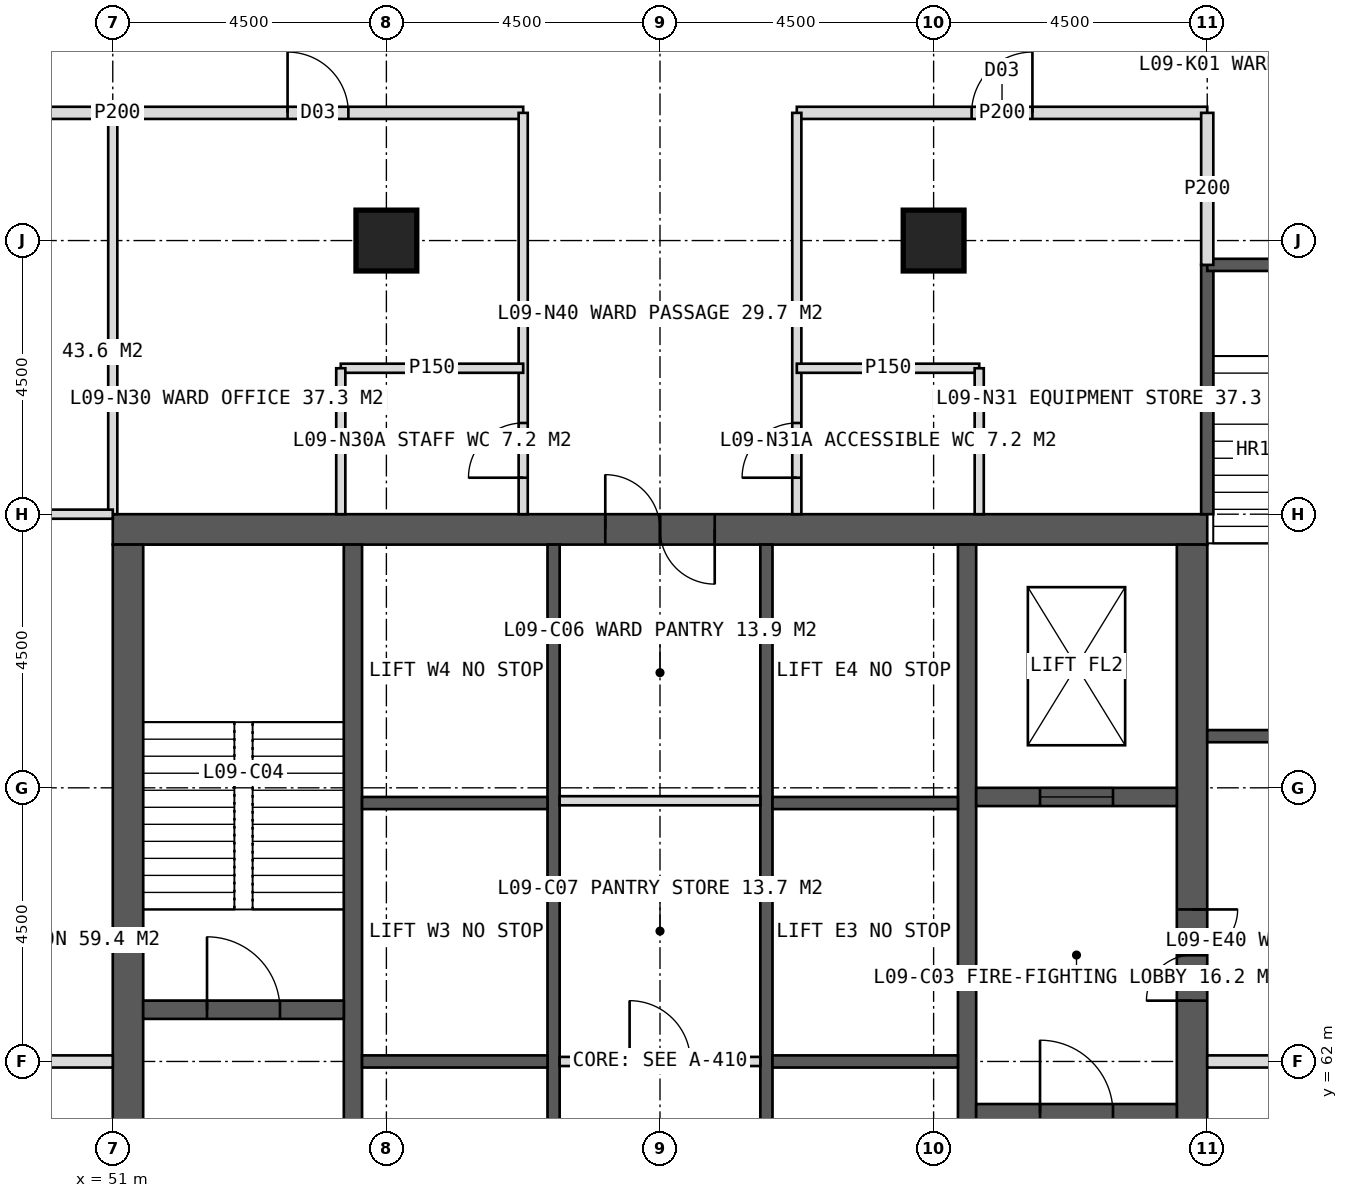
"""IFC4 building model, lengths in metres.
Left out: names, types, materials, properties, quantities, classifications, styles, units other than length and angle.
Written with IfcOpenShell. Run it as: python <this file> out.ifc"""

import sys

from ifc_helpers import new_model, si_unit, direction, frame, frame_2d, origin, origin_2d, place, context, subcontext, project, spatial, rectangle, hollow_rectangle, extrude, element, fill, save


model = new_model("IFC4")
c1 = context("Model", 3, precision=1e-05, world=origin(), true_north=direction((0.0, 1.0)))
c2 = subcontext(c1, "Body", "Model", "MODEL_VIEW")
j1 = project(units=[si_unit("LENGTHUNIT", "METRE"), si_unit("PLANEANGLEUNIT", "RADIAN")], contexts=[c1])
p1 = place(None, origin())
s1 = spatial("IfcSite", under=j1, at=p1, CompositionType="ELEMENT")
p2 = place(p1, origin())
s2 = spatial("IfcBuilding", under=s1, at=p2, CompositionType="ELEMENT")
p3 = place(p2, frame((0.0, 0.0, 43.0)))
s3 = spatial("IfcBuildingStorey", under=s2, at=p3, CompositionType="ELEMENT", Elevation=43.0)
p4 = place(p3, frame((51.0, 70.75, 0.0), z_axis=(0.0, 0.0, 1.0), x_axis=(1.0, 0.0, 0.0)))
e1 = element("IfcWall", 1, at=p4, inside=s3, PredefinedType="SHEAR", context=c2, shape_type="SweptSolid", body=[
    extrude(rectangle(XDim=18.0, YDim=0.5, at=frame_2d((9.0, 0.0))), origin(), (0.0, 0.0, 1.0), 4.0),
])
p5 = place(p4, frame((8.1, 0.0, 0.0)))
e2 = element("IfcOpeningElement", 2, at=p5, cuts=e1, PredefinedType="OPENING", context=c2, shape_type="SweptSolid", body=[
    extrude(rectangle(XDim=1.8, YDim=2.2, at=frame_2d((0.9, 1.1))), frame((0.0, 0.26, 0.0), z_axis=(0.0, -1.0, 0.0), x_axis=(1.0, 0.0, 0.0)), (0.0, 0.0, 1.0), 0.52),
])
p6 = place(p3, frame((51.25, 53.5, 0.0), z_axis=(0.0, 0.0, 1.0), x_axis=(0.0, 1.0, 0.0)))
e3 = element("IfcWall", 3, at=p6, inside=s3, PredefinedType="SHEAR", context=c2, shape_type="SweptSolid", body=[
    extrude(rectangle(XDim=17.0, YDim=0.5, at=frame_2d((8.5, 0.0))), origin(), (0.0, 0.0, 1.0), 4.0),
])
p7 = place(p6, frame((6.0, 0.0, 0.0)))
e4 = element("IfcOpeningElement", 4, at=p7, cuts=e3, PredefinedType="OPENING", context=c2, shape_type="SweptSolid", body=[
    extrude(rectangle(XDim=1.5, YDim=2.2, at=frame_2d((0.75, 1.1))), frame((0.0, 0.26, 0.0), z_axis=(0.0, -1.0, 0.0), x_axis=(1.0, 0.0, 0.0)), (0.0, 0.0, 1.0), 0.52),
])
p8 = place(p3, frame((68.75, 53.5, 0.0), z_axis=(0.0, 0.0, 1.0), x_axis=(0.0, 1.0, 0.0)))
e5 = element("IfcWall", 5, at=p8, inside=s3, PredefinedType="SHEAR", context=c2, shape_type="SweptSolid", body=[
    extrude(rectangle(XDim=17.0, YDim=0.5, at=frame_2d((8.5, 0.0))), origin(), (0.0, 0.0, 1.0), 4.0),
])
p9 = place(p8, frame((9.5, 0.0, 0.0)))
e6 = element("IfcOpeningElement", 6, at=p9, cuts=e5, PredefinedType="OPENING", context=c2, shape_type="SweptSolid", body=[
    extrude(rectangle(XDim=1.5, YDim=2.2, at=frame_2d((0.75, 1.1))), frame((0.0, 0.26, 0.0), z_axis=(0.0, -1.0, 0.0), x_axis=(1.0, 0.0, 0.0)), (0.0, 0.0, 1.0), 0.52),
])
for number, where, z_axis, x_axis in (
    (7, (54.95, 53.5, 0.0), (0.0, 0.0, 1.0), (0.0, 1.0, 0.0)),
    (8, (65.05, 53.5, 0.0), (0.0, 0.0, 1.0), (0.0, 1.0, 0.0)),
):
    element("IfcWall", number, at=place(p3, frame(where, z_axis=z_axis, x_axis=x_axis)), inside=s3, PredefinedType="SHEAR", context=c2, shape_type="SweptSolid", body=[
        extrude(rectangle(XDim=17.0, YDim=0.3, at=frame_2d((8.5, 0.0))), origin(), (0.0, 0.0, 1.0), 4.0),
    ])
p10 = place(p3, frame((58.25, 53.5, 0.0), z_axis=(0.0, 0.0, 1.0), x_axis=(0.0, 1.0, 0.0)))
e9 = element("IfcWall", 9, at=p10, inside=s3, PredefinedType="SHEAR", context=c2, shape_type="SweptSolid", body=[
    extrude(rectangle(XDim=17.0, YDim=0.2, at=frame_2d((8.5, 0.0))), origin(), (0.0, 0.0, 1.0), 4.0),
])
p11 = place(p10, frame((1.375, 0.0, 0.0)))
e10 = element("IfcOpeningElement", 10, at=p11, cuts=e9, PredefinedType="OPENING", context=c2, shape_type="SweptSolid", body=[
    extrude(rectangle(XDim=1.4, YDim=2.2, at=frame_2d((0.7, 1.1))), frame((0.0, 0.11, 0.0), z_axis=(0.0, -1.0, 0.0), x_axis=(1.0, 0.0, 0.0)), (0.0, 0.0, 1.0), 0.22),
])
p12 = place(p10, frame((5.675, 0.0, 0.0)))
e11 = element("IfcOpeningElement", 11, at=p12, cuts=e9, PredefinedType="OPENING", context=c2, shape_type="SweptSolid", body=[
    extrude(rectangle(XDim=1.4, YDim=2.2, at=frame_2d((0.7, 1.1))), frame((0.0, 0.11, 0.0), z_axis=(0.0, -1.0, 0.0), x_axis=(1.0, 0.0, 0.0)), (0.0, 0.0, 1.0), 0.22),
])
p13 = place(p3, frame((61.75, 53.5, 0.0), z_axis=(0.0, 0.0, 1.0), x_axis=(0.0, 1.0, 0.0)))
e12 = element("IfcWall", 12, at=p13, inside=s3, PredefinedType="SHEAR", context=c2, shape_type="SweptSolid", body=[
    extrude(rectangle(XDim=17.0, YDim=0.2, at=frame_2d((8.5, 0.0))), origin(), (0.0, 0.0, 1.0), 4.0),
])
p14 = place(p13, frame((1.375, 0.0, 0.0)))
e13 = element("IfcOpeningElement", 13, at=p14, cuts=e12, PredefinedType="OPENING", context=c2, shape_type="SweptSolid", body=[
    extrude(rectangle(XDim=1.4, YDim=2.2, at=frame_2d((0.7, 1.1))), frame((0.0, 0.11, 0.0), z_axis=(0.0, -1.0, 0.0), x_axis=(1.0, 0.0, 0.0)), (0.0, 0.0, 1.0), 0.22),
])
p15 = place(p13, frame((5.675, 0.0, 0.0)))
e14 = element("IfcOpeningElement", 14, at=p15, cuts=e12, PredefinedType="OPENING", context=c2, shape_type="SweptSolid", body=[
    extrude(rectangle(XDim=1.4, YDim=2.2, at=frame_2d((0.7, 1.1))), frame((0.0, 0.11, 0.0), z_axis=(0.0, -1.0, 0.0), x_axis=(1.0, 0.0, 0.0)), (0.0, 0.0, 1.0), 0.22),
])
for number, where, z_axis, x_axis in (
    (15, (55.1, 62.0, 0.0), (0.0, 0.0, 1.0), (1.0, 0.0, 0.0)),
    (16, (61.85, 62.0, 0.0), (0.0, 0.0, 1.0), (1.0, 0.0, 0.0)),
    (17, (55.1, 66.25, 0.0), (0.0, 0.0, 1.0), (1.0, 0.0, 0.0)),
    (18, (61.85, 66.25, 0.0), (0.0, 0.0, 1.0), (1.0, 0.0, 0.0)),
):
    element("IfcWall", number, at=place(p3, frame(where, z_axis=z_axis, x_axis=x_axis)), inside=s3, PredefinedType="SHEAR", context=c2, shape_type="SweptSolid", body=[
        extrude(rectangle(XDim=3.05, YDim=0.2, at=frame_2d((1.525, 0.0))), origin(), (0.0, 0.0, 1.0), 4.0),
    ])
p16 = place(p3, frame((51.5, 62.85, 0.0), z_axis=(0.0, 0.0, 1.0), x_axis=(1.0, 0.0, 0.0)))
e19 = element("IfcWall", 19, at=p16, inside=s3, PredefinedType="SHEAR", context=c2, shape_type="SweptSolid", body=[
    extrude(rectangle(XDim=3.3, YDim=0.3, at=frame_2d((1.65, 0.0))), origin(), (0.0, 0.0, 1.0), 4.0),
])
p17 = place(p16, frame((1.05, 0.0, 0.0)))
e20 = element("IfcOpeningElement", 20, at=p17, cuts=e19, PredefinedType="OPENING", context=c2, shape_type="SweptSolid", body=[
    extrude(rectangle(XDim=1.2, YDim=2.1, at=frame_2d((0.6, 1.05))), frame((0.0, 0.16, 0.0), z_axis=(0.0, -1.0, 0.0), x_axis=(1.0, 0.0, 0.0)), (0.0, 0.0, 1.0), 0.32),
])
p18 = place(p3, frame((65.2, 61.15, 0.0), z_axis=(0.0, 0.0, 1.0), x_axis=(1.0, 0.0, 0.0)))
e21 = element("IfcWall", 21, at=p18, inside=s3, PredefinedType="SHEAR", context=c2, shape_type="SweptSolid", body=[
    extrude(rectangle(XDim=3.3, YDim=0.3, at=frame_2d((1.65, 0.0))), origin(), (0.0, 0.0, 1.0), 4.0),
])
p19 = place(p18, frame((1.05, 0.0, 0.0)))
e22 = element("IfcOpeningElement", 22, at=p19, cuts=e21, PredefinedType="OPENING", context=c2, shape_type="SweptSolid", body=[
    extrude(rectangle(XDim=1.2, YDim=2.1, at=frame_2d((0.6, 1.05))), frame((0.0, 0.16, 0.0), z_axis=(0.0, -1.0, 0.0), x_axis=(1.0, 0.0, 0.0)), (0.0, 0.0, 1.0), 0.32),
])
p20 = place(p3, frame((65.2, 66.35, 0.0), z_axis=(0.0, 0.0, 1.0), x_axis=(1.0, 0.0, 0.0)))
e23 = element("IfcWall", 23, at=p20, inside=s3, PredefinedType="SHEAR", context=c2, shape_type="SweptSolid", body=[
    extrude(rectangle(XDim=3.3, YDim=0.3, at=frame_2d((1.65, 0.0))), origin(), (0.0, 0.0, 1.0), 4.0),
])
p21 = place(p20, frame((1.05, 0.0, 0.0)))
e24 = element("IfcOpeningElement", 24, at=p21, cuts=e23, PredefinedType="OPENING", context=c2, shape_type="SweptSolid", body=[
    extrude(rectangle(XDim=1.2, YDim=2.2, at=frame_2d((0.6, 1.1))), frame((0.0, 0.16, 0.0), z_axis=(0.0, -1.0, 0.0), x_axis=(1.0, 0.0, 0.0)), (0.0, 0.0, 1.0), 0.32),
])
for number, where, z_axis, x_axis in (
    (25, (55.5, 75.5, 0.0), (0.0, 0.0, 1.0), (1.0, 0.0, 0.0)),
    (26, (64.5, 75.5, 0.0), (0.0, 0.0, 1.0), (1.0, 0.0, 0.0)),
):
    element("IfcColumn", number, at=place(p3, frame(where, z_axis=z_axis, x_axis=x_axis)), inside=s3, PredefinedType="COLUMN", context=c2, shape_type="SweptSolid", body=[
        extrude(hollow_rectangle(XDim=1.0, YDim=1.0, WallThickness=0.1, at=origin_2d()), origin(), (0.0, 0.0, 1.0), 4.0),
    ])
p22 = place(p3, frame((51.0, 71.0, 0.0), z_axis=(0.0, 0.0, 1.0), x_axis=(0.0, 1.0, 0.0)))
e27 = element("IfcWall", 27, at=p22, inside=s3, PredefinedType="PARTITIONING", context=c2, shape_type="SweptSolid", body=[
    extrude(rectangle(XDim=6.6, YDim=0.15, at=frame_2d((3.3, 0.0))), origin(), (0.0, 0.0, 1.0), 3.75),
])
p23 = place(p3, frame((44.4, 77.6, 0.0), z_axis=(0.0, 0.0, 1.0), x_axis=(1.0, 0.0, 0.0)))
e28 = element("IfcWall", 28, at=p23, inside=s3, PredefinedType="PARTITIONING", context=c2, shape_type="SweptSolid", body=[
    extrude(rectangle(XDim=13.35, YDim=0.2, at=frame_2d((6.675, 0.0))), origin(), (0.0, 0.0, 1.0), 3.75),
])
p24 = place(p23, frame((9.475, 0.0, 0.0)))
e29 = element("IfcOpeningElement", 29, at=p24, cuts=e28, PredefinedType="OPENING", context=c2, shape_type="SweptSolid", body=[
    extrude(rectangle(XDim=1.0, YDim=2.1, at=frame_2d((0.5, 1.05))), frame((0.0, 0.11, 0.0), z_axis=(0.0, -1.0, 0.0), x_axis=(1.0, 0.0, 0.0)), (0.0, 0.0, 1.0), 0.22),
])
p25 = place(p3, frame((62.25, 77.6, 0.0), z_axis=(0.0, 0.0, 1.0), x_axis=(1.0, 0.0, 0.0)))
e30 = element("IfcWall", 30, at=p25, inside=s3, PredefinedType="PARTITIONING", context=c2, shape_type="SweptSolid", body=[
    extrude(rectangle(XDim=6.75, YDim=0.2, at=frame_2d((3.375, 0.0))), origin(), (0.0, 0.0, 1.0), 3.75),
])
p26 = place(p25, frame((2.875, 0.0, 0.0)))
e31 = element("IfcOpeningElement", 31, at=p26, cuts=e30, PredefinedType="OPENING", context=c2, shape_type="SweptSolid", body=[
    extrude(rectangle(XDim=1.0, YDim=2.1, at=frame_2d((0.5, 1.05))), frame((0.0, 0.11, 0.0), z_axis=(0.0, -1.0, 0.0), x_axis=(1.0, 0.0, 0.0)), (0.0, 0.0, 1.0), 0.22),
])
p27 = place(p3, frame((57.75, 71.0, 0.0), z_axis=(0.0, 0.0, 1.0), x_axis=(0.0, 1.0, 0.0)))
e32 = element("IfcWall", 32, at=p27, inside=s3, PredefinedType="PARTITIONING", context=c2, shape_type="SweptSolid", body=[
    extrude(rectangle(XDim=6.6, YDim=0.15, at=frame_2d((3.3, 0.0))), origin(), (0.0, 0.0, 1.0), 3.75),
])
p28 = place(p27, frame((0.6, 0.0, 0.0)))
e33 = element("IfcOpeningElement", 33, at=p28, cuts=e32, PredefinedType="OPENING", context=c2, shape_type="SweptSolid", body=[
    extrude(rectangle(XDim=0.9, YDim=2.1, at=frame_2d((0.45, 1.05))), frame((0.0, 0.085, 0.0), z_axis=(0.0, -1.0, 0.0), x_axis=(1.0, 0.0, 0.0)), (0.0, 0.0, 1.0), 0.17),
])
p29 = place(p3, frame((62.25, 71.0, 0.0), z_axis=(0.0, 0.0, 1.0), x_axis=(0.0, 1.0, 0.0)))
e34 = element("IfcWall", 34, at=p29, inside=s3, PredefinedType="PARTITIONING", context=c2, shape_type="SweptSolid", body=[
    extrude(rectangle(XDim=6.6, YDim=0.15, at=frame_2d((3.3, 0.0))), origin(), (0.0, 0.0, 1.0), 3.75),
])
p30 = place(p29, frame((0.6, 0.0, 0.0)))
e35 = element("IfcOpeningElement", 35, at=p30, cuts=e34, PredefinedType="OPENING", context=c2, shape_type="SweptSolid", body=[
    extrude(rectangle(XDim=0.9, YDim=2.1, at=frame_2d((0.45, 1.05))), frame((0.0, 0.085, 0.0), z_axis=(0.0, -1.0, 0.0), x_axis=(1.0, 0.0, 0.0)), (0.0, 0.0, 1.0), 0.17),
])
p31 = place(p3, frame((54.75, 73.4, 0.0), z_axis=(0.0, 0.0, 1.0), x_axis=(1.0, 0.0, 0.0)))
e36 = element("IfcWall", 36, at=p31, inside=s3, PredefinedType="PARTITIONING", context=c2, shape_type="SweptSolid", body=[
    extrude(rectangle(XDim=3.0, YDim=0.15, at=frame_2d((1.5, 0.0))), origin(), (0.0, 0.0, 1.0), 3.75),
])
p32 = place(p3, frame((54.75, 71.0, 0.0), z_axis=(0.0, 0.0, 1.0), x_axis=(0.0, 1.0, 0.0)))
e37 = element("IfcWall", 37, at=p32, inside=s3, PredefinedType="PARTITIONING", context=c2, shape_type="SweptSolid", body=[
    extrude(rectangle(XDim=2.4, YDim=0.15, at=frame_2d((1.2, 0.0))), origin(), (0.0, 0.0, 1.0), 3.75),
])
p33 = place(p3, frame((62.25, 73.4, 0.0), z_axis=(0.0, 0.0, 1.0), x_axis=(1.0, 0.0, 0.0)))
e38 = element("IfcWall", 38, at=p33, inside=s3, PredefinedType="PARTITIONING", context=c2, shape_type="SweptSolid", body=[
    extrude(rectangle(XDim=3.0, YDim=0.15, at=frame_2d((1.5, 0.0))), origin(), (0.0, 0.0, 1.0), 3.75),
])
p34 = place(p3, frame((65.25, 71.0, 0.0), z_axis=(0.0, 0.0, 1.0), x_axis=(0.0, 1.0, 0.0)))
e39 = element("IfcWall", 39, at=p34, inside=s3, PredefinedType="PARTITIONING", context=c2, shape_type="SweptSolid", body=[
    extrude(rectangle(XDim=2.4, YDim=0.15, at=frame_2d((1.2, 0.0))), origin(), (0.0, 0.0, 1.0), 3.75),
])
p35 = place(p3, frame((51.0, 62.0, 0.0), z_axis=(0.0, 0.0, 1.0), x_axis=(-1.0, 0.0, 0.0)))
e40 = element("IfcWall", 40, at=p35, inside=s3, PredefinedType="SOLIDWALL", context=c2, shape_type="SweptSolid", body=[
    extrude(rectangle(XDim=6.6, YDim=0.2, at=frame_2d((3.3, 0.0))), origin(), (0.0, 0.0, 1.0), 2.75),
])
p36 = place(p3, frame((51.0, 71.0, 0.0), z_axis=(0.0, 0.0, 1.0), x_axis=(-1.0, 0.0, 0.0)))
e41 = element("IfcWall", 41, at=p36, inside=s3, PredefinedType="PARTITIONING", context=c2, shape_type="SweptSolid", body=[
    extrude(rectangle(XDim=6.6, YDim=0.15, at=frame_2d((3.3, 0.0))), origin(), (0.0, 0.0, 1.0), 3.75),
])
p37 = place(p3, frame((69.0, 62.0, 0.0), z_axis=(0.0, 0.0, 1.0), x_axis=(1.0, 0.0, 0.0)))
e42 = element("IfcWall", 42, at=p37, inside=s3, PredefinedType="SOLIDWALL", context=c2, shape_type="SweptSolid", body=[
    extrude(rectangle(XDim=6.6, YDim=0.2, at=frame_2d((3.3, 0.0))), origin(), (0.0, 0.0, 1.0), 2.75),
])
p38 = place(p3, frame((58.35, 62.0, 0.0), z_axis=(0.0, 0.0, 1.0), x_axis=(1.0, 0.0, 0.0)))
e43 = element("IfcWall", 43, at=p38, inside=s3, PredefinedType="PARTITIONING", context=c2, shape_type="SweptSolid", body=[
    extrude(rectangle(XDim=3.3, YDim=0.15, at=frame_2d((1.65, 0.0))), origin(), (0.0, 0.0, 1.0), 3.75),
])
p39 = place(p38, frame((1.15, 0.0, 0.0)))
e44 = element("IfcOpeningElement", 44, at=p39, cuts=e43, PredefinedType="OPENING", context=c2, shape_type="SweptSolid", body=[
    extrude(rectangle(XDim=1.0, YDim=2.1, at=frame_2d((0.5, 1.05))), frame((0.0, 0.085, 0.0), z_axis=(0.0, -1.0, 0.0), x_axis=(1.0, 0.0, 0.0)), (0.0, 0.0, 1.0), 0.17),
])
p40 = place(p3, frame((58.35, 66.288, 0.0), z_axis=(0.0, 0.0, 1.0), x_axis=(1.0, 0.0, 0.0)))
e45 = element("IfcWall", 45, at=p40, inside=s3, PredefinedType="PARTITIONING", context=c2, shape_type="SweptSolid", body=[
    extrude(rectangle(XDim=3.3, YDim=0.15, at=frame_2d((1.65, 0.0))), origin(), (0.0, 0.0, 1.0), 3.75),
])
p41 = place(p3, frame((69.0, 71.0, 0.0), z_axis=(0.0, 0.0, 1.0), x_axis=(0.0, 1.0, 0.0)))
e46 = element("IfcWall", 46, at=p41, inside=s3, PredefinedType="SOLIDWALL", context=c2, shape_type="SweptSolid", body=[
    extrude(rectangle(XDim=4.1, YDim=0.2, at=frame_2d((2.05, 0.0))), origin(), (0.0, 0.0, 1.0), 3.75),
])
p42 = place(p3, frame((69.0, 67.35, 0.0), z_axis=(0.0, 0.0, 1.0), x_axis=(1.0, 0.0, 0.0)))
e47 = element("IfcWall", 47, at=p42, inside=s3, PredefinedType="SOLIDWALL", context=c2, shape_type="SweptSolid", body=[
    extrude(rectangle(XDim=3.5, YDim=0.2, at=frame_2d((1.75, 0.0))), origin(), (0.0, 0.0, 1.0), 3.75),
])
p43 = place(p3, frame((69.0, 75.1, 0.0), z_axis=(0.0, 0.0, 1.0), x_axis=(1.0, 0.0, 0.0)))
e48 = element("IfcWall", 48, at=p43, inside=s3, PredefinedType="SOLIDWALL", context=c2, shape_type="SweptSolid", body=[
    extrude(rectangle(XDim=3.5, YDim=0.2, at=frame_2d((1.75, 0.0))), origin(), (0.0, 0.0, 1.0), 3.75),
])
p44 = place(p43, frame((1.15, 0.0, 0.0)))
e49 = element("IfcOpeningElement", 49, at=p44, cuts=e48, PredefinedType="OPENING", context=c2, shape_type="SweptSolid", body=[
    extrude(rectangle(XDim=1.2, YDim=2.1, at=frame_2d((0.6, 1.05))), frame((0.0, 0.11, 0.0), z_axis=(0.0, -1.0, 0.0), x_axis=(1.0, 0.0, 0.0)), (0.0, 0.0, 1.0), 0.22),
])
p45 = place(p3, frame((69.0, 75.1, 0.0), z_axis=(0.0, 0.0, 1.0), x_axis=(0.0, 1.0, 0.0)))
e50 = element("IfcWall", 50, at=p45, inside=s3, PredefinedType="PARTITIONING", context=c2, shape_type="SweptSolid", body=[
    extrude(rectangle(XDim=2.5, YDim=0.2, at=frame_2d((1.25, 0.0))), origin(), (0.0, 0.0, 1.0), 3.75),
])
p46 = place(p28, origin())
e51 = element("IfcDoor", 51, at=p46, inside=s3, OperationType="SINGLE_SWING_LEFT", PredefinedType="DOOR", context=c2, shape_type="SweptSolid", body=[
    extrude(rectangle(XDim=0.9, YDim=2.1, at=frame_2d((0.45, 1.05))), frame((0.0, 0.025, 0.0), z_axis=(0.0, -1.0, 0.0), x_axis=(1.0, 0.0, 0.0)), (0.0, 0.0, 1.0), 0.05),
])
fill(e33, e51)
p47 = place(p24, origin())
e52 = element("IfcDoor", 52, at=p47, inside=s3, OperationType="SINGLE_SWING_LEFT", PredefinedType="DOOR", context=c2, shape_type="SweptSolid", body=[
    extrude(rectangle(XDim=1.0, YDim=2.1, at=frame_2d((0.5, 1.05))), frame((0.0, 0.025, 0.0), z_axis=(0.0, -1.0, 0.0), x_axis=(1.0, 0.0, 0.0)), (0.0, 0.0, 1.0), 0.05),
])
fill(e29, e52)
p48 = place(p30, origin())
e53 = element("IfcDoor", 53, at=p48, inside=s3, OperationType="SINGLE_SWING_LEFT", PredefinedType="DOOR", context=c2, shape_type="SweptSolid", body=[
    extrude(rectangle(XDim=0.9, YDim=2.1, at=frame_2d((0.45, 1.05))), frame((0.0, 0.025, 0.0), z_axis=(0.0, -1.0, 0.0), x_axis=(1.0, 0.0, 0.0)), (0.0, 0.0, 1.0), 0.05),
])
fill(e35, e53)
p49 = place(p26, origin())
e54 = element("IfcDoor", 54, at=p49, inside=s3, OperationType="SINGLE_SWING_RIGHT", PredefinedType="DOOR", context=c2, shape_type="SweptSolid", body=[
    extrude(rectangle(XDim=1.0, YDim=2.1, at=frame_2d((0.5, 1.05))), frame((0.0, 0.025, 0.0), z_axis=(0.0, -1.0, 0.0), x_axis=(1.0, 0.0, 0.0)), (0.0, 0.0, 1.0), 0.05),
])
fill(e31, e54)
p50 = place(p9, origin())
e55 = element("IfcDoor", 55, at=p50, inside=s3, OperationType="DOUBLE_DOOR_SINGLE_SWING", PredefinedType="DOOR", context=c2, shape_type="SweptSolid", body=[
    extrude(rectangle(XDim=1.5, YDim=2.2, at=frame_2d((0.75, 1.1))), frame((0.0, 0.025, 0.0), z_axis=(0.0, -1.0, 0.0), x_axis=(1.0, 0.0, 0.0)), (0.0, 0.0, 1.0), 0.05),
])
fill(e6, e55)
p51 = place(p17, origin())
e56 = element("IfcDoor", 56, at=p51, inside=s3, OperationType="SINGLE_SWING_LEFT", PredefinedType="DOOR", context=c2, shape_type="SweptSolid", body=[
    extrude(rectangle(XDim=1.2, YDim=2.1, at=frame_2d((0.6, 1.05))), frame((0.0, 0.025, 0.0), z_axis=(0.0, -1.0, 0.0), x_axis=(1.0, 0.0, 0.0)), (0.0, 0.0, 1.0), 0.05),
])
fill(e20, e56)
p52 = place(p19, origin())
e57 = element("IfcDoor", 57, at=p52, inside=s3, OperationType="SINGLE_SWING_LEFT", PredefinedType="DOOR", context=c2, shape_type="SweptSolid", body=[
    extrude(rectangle(XDim=1.2, YDim=2.1, at=frame_2d((0.6, 1.05))), frame((0.0, 0.025, 0.0), z_axis=(0.0, -1.0, 0.0), x_axis=(1.0, 0.0, 0.0)), (0.0, 0.0, 1.0), 0.05),
])
fill(e22, e57)
p53 = place(p21, origin())
e58 = element("IfcDoor", 58, at=p53, inside=s3, OperationType="SLIDING_TO_LEFT", PredefinedType="DOOR", context=c2, shape_type="SweptSolid", body=[
    extrude(rectangle(XDim=1.2, YDim=2.2, at=frame_2d((0.6, 1.1))), frame((0.0, 0.025, 0.0), z_axis=(0.0, -1.0, 0.0), x_axis=(1.0, 0.0, 0.0)), (0.0, 0.0, 1.0), 0.05),
])
fill(e24, e58)
p54 = place(p39, origin())
e59 = element("IfcDoor", 59, at=p54, inside=s3, OperationType="SINGLE_SWING_LEFT", PredefinedType="DOOR", context=c2, shape_type="SweptSolid", body=[
    extrude(rectangle(XDim=1.0, YDim=2.1, at=frame_2d((0.5, 1.05))), frame((0.0, 0.025, 0.0), z_axis=(0.0, -1.0, 0.0), x_axis=(1.0, 0.0, 0.0)), (0.0, 0.0, 1.0), 0.05),
])
fill(e44, e59)
p55 = place(p5, origin())
e60 = element("IfcDoor", 60, at=p55, inside=s3, OperationType="DOUBLE_DOOR_SINGLE_SWING", PredefinedType="DOOR", context=c2, shape_type="SweptSolid", body=[
    extrude(rectangle(XDim=1.8, YDim=2.2, at=frame_2d((0.9, 1.1))), frame((0.0, 0.025, 0.0), z_axis=(0.0, -1.0, 0.0), x_axis=(1.0, 0.0, 0.0)), (0.0, 0.0, 1.0), 0.05),
])
fill(e2, e60)
save(model, sys.argv[1])
